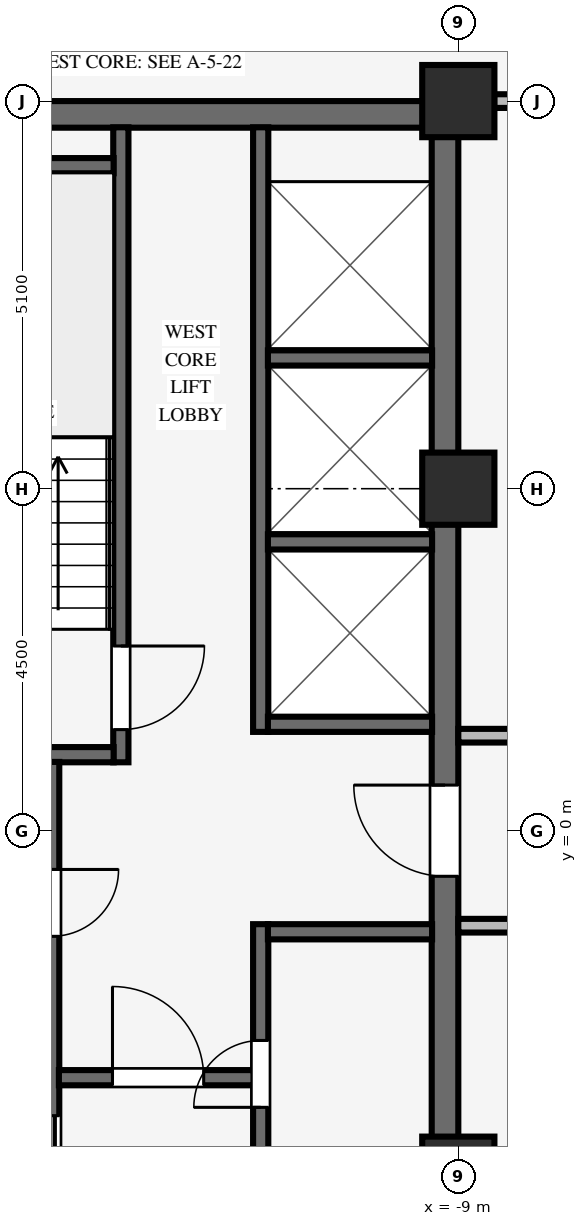
"""IFC4 building model, lengths in metres.
Left out: names, types, materials, properties, quantities, classifications, styles, units other than length and angle.
Written with IfcOpenShell. Run it as: python <this file> out.ifc"""

import sys

from ifc_helpers import new_model, si_unit, direction, frame, frame_2d, origin, origin_2d, place, context, subcontext, project, spatial, rectangle, extrude, source, transform, mapped, element, fill, save


model = new_model("IFC4")
c1 = context("Model", 3, precision=1e-05, world=origin(), true_north=direction((0.0, 1.0)))
c2 = subcontext(c1, "Body", "Model", "MODEL_VIEW")
j1 = project(units=[si_unit("LENGTHUNIT", "METRE"), si_unit("PLANEANGLEUNIT", "RADIAN")], contexts=[c1])
p1 = place(None, origin())
s1 = spatial("IfcSite", under=j1, at=p1, CompositionType="ELEMENT")
p2 = place(p1, origin())
s2 = spatial("IfcBuilding", under=s1, at=p2, CompositionType="ELEMENT")
p3 = place(p2, frame((0.0, 0.0, 216.45)))
s3 = spatial("IfcBuildingStorey", under=s2, at=p3, CompositionType="ELEMENT", Elevation=216.45)
p4 = place(p3, frame((-17.5, 9.425, 0.0), z_axis=(0.0, 0.0, 1.0), x_axis=(1.0, 0.0, 0.0)))
e1 = element("IfcWall", 1, at=p4, inside=s3, PredefinedType="SHEAR", context=c2, shape_type="SweptSolid", body=[
    extrude(rectangle(XDim=8.5, YDim=0.35, at=frame_2d((4.25, 0.0))), origin(), (0.0, 0.0, 1.0), 3.37),
])
p5 = place(p3, frame((-9.175, -9.255, 0.0), z_axis=(0.0, 0.0, 1.0), x_axis=(0.0, 1.0, 0.0)))
e2 = element("IfcWall", 2, at=p5, inside=s3, PredefinedType="SHEAR", context=c2, shape_type="SweptSolid", body=[
    extrude(rectangle(XDim=18.51, YDim=0.35, at=frame_2d((9.255, 0.0))), origin(), (0.0, 0.0, 1.0), 3.37),
])
p6 = place(p5, frame((8.655, 0.0, 0.0)))
e3 = element("IfcOpeningElement", 3, at=p6, cuts=e2, PredefinedType="OPENING", context=c2, shape_type="SweptSolid", body=[
    extrude(rectangle(XDim=1.2, YDim=2.15, at=frame_2d((0.6, 1.075))), frame((0.0, 0.185, 0.0), z_axis=(0.0, -1.0, 0.0), x_axis=(1.0, 0.0, 0.0)), (0.0, 0.0, 1.0), 0.37),
])
for number, where, z_axis, x_axis in (
    (4, (-9.0, -4.5, 0.0), (0.0, 0.0, 1.0), (1.0, 0.0, 0.0)),
    (5, (-9.0, 4.5, 0.0), (0.0, 0.0, 1.0), (1.0, 0.0, 0.0)),
    (6, (-9.0, 9.6, 0.0), (0.0, 0.0, 1.0), (1.0, 0.0, 0.0)),
):
    element("IfcColumn", number, at=place(p3, frame(where, z_axis=z_axis, x_axis=x_axis)), inside=s3, PredefinedType="COLUMN", context=c2, shape_type="SweptSolid", body=[
        extrude(rectangle(XDim=0.95, YDim=0.95, at=origin_2d()), origin(), (0.0, 0.0, 1.0), 3.37),
    ])
p7 = place(p3, frame((-13.44, 0.9, 0.0), z_axis=(0.0, 0.0, 1.0), x_axis=(0.0, 1.0, 0.0)))
e7 = element("IfcWall", 7, at=p7, inside=s3, PredefinedType="SHEAR", context=c2, shape_type="SweptSolid", body=[
    extrude(rectangle(XDim=8.355, YDim=0.2, at=frame_2d((4.177, 0.0))), origin(), (0.0, 0.0, 1.0), 3.37),
])
p8 = place(p7, frame((1.53, 0.0, 0.0), z_axis=(0.0, 0.0, 1.0), x_axis=(-1.0, 0.0, 0.0)))
e8 = element("IfcOpeningElement", 8, at=p8, cuts=e7, PredefinedType="OPENING", context=c2, shape_type="SweptSolid", body=[
    extrude(rectangle(XDim=1.1, YDim=2.15, at=frame_2d((0.55, 1.075))), frame((0.0, 0.11, 0.0), z_axis=(0.0, -1.0, 0.0), x_axis=(1.0, 0.0, 0.0)), (0.0, 0.0, 1.0), 0.22),
])
for number, where, z_axis, x_axis in (
    (9, (-17.155, 1.0, 0.0), (0.0, 0.0, 1.0), (1.0, 0.0, 0.0)),
    (10, (-17.155, 8.75, 0.0), (0.0, 0.0, 1.0), (1.0, 0.0, 0.0)),
):
    element("IfcWall", number, at=place(p3, frame(where, z_axis=z_axis, x_axis=x_axis)), inside=s3, PredefinedType="SHEAR", context=c2, shape_type="SweptSolid", body=[
        extrude(rectangle(XDim=3.62, YDim=0.2, at=frame_2d((1.81, 0.0))), origin(), (0.0, 0.0, 1.0), 3.37),
    ])
p9 = place(p3, frame((-14.35, -6.2, 0.0), z_axis=(0.0, 0.0, 1.0), x_axis=(0.0, 1.0, 0.0)))
e11 = element("IfcWall", 11, at=p9, inside=s3, PredefinedType="SHEAR", context=c2, shape_type="SweptSolid", body=[
    extrude(rectangle(XDim=7.105, YDim=0.2, at=frame_2d((3.552, 0.0))), origin(), (0.0, 0.0, 1.0), 3.37),
])
p10 = place(p9, frame((5.69, 0.0, 0.0), z_axis=(0.0, 0.0, 1.0), x_axis=(-1.0, 0.0, 0.0)))
e12 = element("IfcOpeningElement", 12, at=p10, cuts=e11, PredefinedType="OPENING", context=c2, shape_type="SweptSolid", body=[
    extrude(rectangle(XDim=0.88, YDim=2.1, at=frame_2d((0.44, 1.05))), frame((0.0, 0.11, 0.0), z_axis=(0.0, -1.0, 0.0), x_axis=(1.0, 0.0, 0.0)), (0.0, 0.0, 1.0), 0.22),
])
p11 = place(p9, frame((1.15, 0.0, 0.0)))
e13 = element("IfcOpeningElement", 13, at=p11, cuts=e11, PredefinedType="OPENING", context=c2, shape_type="SweptSolid", body=[
    extrude(rectangle(XDim=1.3, YDim=2.2, at=frame_2d((0.65, 1.1))), frame((0.0, 0.11, 0.0), z_axis=(0.0, -1.0, 0.0), x_axis=(1.0, 0.0, 0.0)), (0.0, 0.0, 1.0), 0.22),
])
p12 = place(p3, frame((-11.6, -9.255, 0.0), z_axis=(0.0, 0.0, 1.0), x_axis=(0.0, 1.0, 0.0)))
e14 = element("IfcWall", 14, at=p12, inside=s3, PredefinedType="SHEAR", context=c2, shape_type="SweptSolid", body=[
    extrude(rectangle(XDim=8.025, YDim=0.2, at=frame_2d((4.012, 0.0))), origin(), (0.0, 0.0, 1.0), 3.37),
])
p13 = place(p12, frame((5.615, 0.0, 0.0)))
e15 = element("IfcOpeningElement", 15, at=p13, cuts=e14, PredefinedType="OPENING", context=c2, shape_type="SweptSolid", body=[
    extrude(rectangle(XDim=0.88, YDim=2.1, at=frame_2d((0.44, 1.05))), frame((0.0, 0.11, 0.0), z_axis=(0.0, -1.0, 0.0), x_axis=(1.0, 0.0, 0.0)), (0.0, 0.0, 1.0), 0.22),
])
p14 = place(p3, frame((-14.255, -3.25, 0.0), z_axis=(0.0, 0.0, 1.0), x_axis=(1.0, 0.0, 0.0)))
e16 = element("IfcWall", 16, at=p14, inside=s3, PredefinedType="SHEAR", context=c2, shape_type="SweptSolid", body=[
    extrude(rectangle(XDim=2.56, YDim=0.2, at=frame_2d((1.28, 0.0))), origin(), (0.0, 0.0, 1.0), 3.37),
])
p15 = place(p14, frame((0.705, 0.0, 0.0)))
e17 = element("IfcOpeningElement", 17, at=p15, cuts=e16, PredefinedType="OPENING", context=c2, shape_type="SweptSolid", body=[
    extrude(rectangle(XDim=1.2, YDim=2.15, at=frame_2d((0.6, 1.075))), frame((0.0, 0.11, 0.0), z_axis=(0.0, -1.0, 0.0), x_axis=(1.0, 0.0, 0.0)), (0.0, 0.0, 1.0), 0.22),
])
p16 = place(p3, frame((-11.505, -1.33, 0.0), z_axis=(0.0, 0.0, 1.0), x_axis=(1.0, 0.0, 0.0)))
e18 = element("IfcWall", 18, at=p16, inside=s3, PredefinedType="SHEAR", context=c2, shape_type="SweptSolid", body=[
    extrude(rectangle(XDim=2.16, YDim=0.2, at=frame_2d((1.08, 0.0))), origin(), (0.0, 0.0, 1.0), 3.37),
])
p17 = place(p3, frame((-11.6, 1.3, 0.0), z_axis=(0.0, 0.0, 1.0), x_axis=(0.0, 1.0, 0.0)))
e19 = element("IfcWall", 19, at=p17, inside=s3, PredefinedType="SHEAR", context=c2, shape_type="SweptSolid", body=[
    extrude(rectangle(XDim=7.955, YDim=0.2, at=frame_2d((3.978, 0.0))), origin(), (0.0, 0.0, 1.0), 3.37),
])
for number, where, z_axis, x_axis in (
    (20, (-11.505, 1.4, 0.0), (0.0, 0.0, 1.0), (1.0, 0.0, 0.0)),
    (21, (-11.505, 3.8, 0.0), (0.0, 0.0, 1.0), (1.0, 0.0, 0.0)),
    (22, (-11.505, 6.22, 0.0), (0.0, 0.0, 1.0), (1.0, 0.0, 0.0)),
):
    element("IfcWall", number, at=place(p3, frame(where, z_axis=z_axis, x_axis=x_axis)), inside=s3, PredefinedType="SHEAR", context=c2, shape_type="SweptSolid", body=[
        extrude(rectangle(XDim=2.16, YDim=0.2, at=frame_2d((1.08, 0.0))), origin(), (0.0, 0.0, 1.0), 3.37),
    ])
p18 = place(p3, frame((-9.0, -1.25, 0.0), z_axis=(0.0, 0.0, 1.0), x_axis=(1.0, 0.0, 0.0)))
e23 = element("IfcWall", 23, at=p18, inside=s3, PredefinedType="PARTITIONING", context=c2, shape_type="SweptSolid", body=[
    extrude(rectangle(XDim=15.6, YDim=0.18, at=frame_2d((7.8, 0.0))), origin(), (0.0, 0.0, 1.0), 3.36),
])
p19 = place(p18, frame((10.97, 0.0, 0.0)))
e24 = element("IfcOpeningElement", 24, at=p19, cuts=e23, PredefinedType="OPENING", context=c2, shape_type="SweptSolid", body=[
    extrude(rectangle(XDim=0.96, YDim=2.1, at=frame_2d((0.48, 1.05))), frame((0.0, 0.1, 0.0), z_axis=(0.0, -1.0, 0.0), x_axis=(1.0, 0.0, 0.0)), (0.0, 0.0, 1.0), 0.2),
])
p20 = place(p18, frame((3.17, 0.0, 0.0)))
e25 = element("IfcOpeningElement", 25, at=p20, cuts=e23, PredefinedType="OPENING", context=c2, shape_type="SweptSolid", body=[
    extrude(rectangle(XDim=0.96, YDim=2.1, at=frame_2d((0.48, 1.05))), frame((0.0, 0.1, 0.0), z_axis=(0.0, -1.0, 0.0), x_axis=(1.0, 0.0, 0.0)), (0.0, 0.0, 1.0), 0.2),
])
p21 = place(p3, frame((-9.0, 1.25, 0.0), z_axis=(0.0, 0.0, 1.0), x_axis=(1.0, 0.0, 0.0)))
e26 = element("IfcWall", 26, at=p21, inside=s3, PredefinedType="PARTITIONING", context=c2, shape_type="SweptSolid", body=[
    extrude(rectangle(XDim=15.6, YDim=0.18, at=frame_2d((7.8, 0.0))), origin(), (0.0, 0.0, 1.0), 3.36),
])
p22 = place(p21, frame((4.87, 0.0, 0.0)))
e27 = element("IfcOpeningElement", 27, at=p22, cuts=e26, PredefinedType="OPENING", context=c2, shape_type="SweptSolid", body=[
    extrude(rectangle(XDim=0.96, YDim=2.1, at=frame_2d((0.48, 1.05))), frame((0.0, 0.1, 0.0), z_axis=(0.0, -1.0, 0.0), x_axis=(1.0, 0.0, 0.0)), (0.0, 0.0, 1.0), 0.2),
])
p23 = place(p3, frame((-8.529, 9.6, 0.0), z_axis=(0.0, 0.0, 1.0), x_axis=(1.0, 0.0, 0.0)))
e28 = element("IfcWall", 28, at=p23, inside=s3, PredefinedType="PARTITIONING", context=c2, shape_type="SweptSolid", body=[
    extrude(rectangle(XDim=8.378, YDim=0.18, at=frame_2d((4.189, 0.0))), origin(), (0.0, 0.0, 1.0), 2.405),
])
m1 = source(origin(), c2, "Body", "SweptSolid", [
    extrude(rectangle(XDim=1.1, YDim=2.15, at=frame_2d((0.55, 1.075))), frame((0.0, 0.025, 0.0), z_axis=(0.0, -1.0, 0.0), x_axis=(1.0, 0.0, 0.0)), (0.0, 0.0, 1.0), 0.05),
])
p24 = place(p8, origin())
e29 = element("IfcDoor", 29, at=p24, inside=s3, OperationType="SINGLE_SWING_LEFT", PredefinedType="DOOR", context=c2, shape_type="MappedRepresentation", body=[
    mapped(m1, transform((0.0, 0.0, 0.0), scale=1.0)),
])
fill(e8, e29)
m2 = source(origin(), c2, "Body", "SweptSolid", [
    extrude(rectangle(XDim=0.88, YDim=2.1, at=frame_2d((0.44, 1.05))), frame((0.0, 0.025, 0.0), z_axis=(0.0, -1.0, 0.0), x_axis=(1.0, 0.0, 0.0)), (0.0, 0.0, 1.0), 0.05),
])
p25 = place(p10, origin())
e30 = element("IfcDoor", 30, at=p25, inside=s3, OperationType="SINGLE_SWING_LEFT", PredefinedType="DOOR", context=c2, shape_type="MappedRepresentation", body=[
    mapped(m2, transform((0.0, 0.0, 0.0), scale=1.0)),
])
fill(e12, e30)
m3 = source(origin(), c2, "Body", "SweptSolid", [
    extrude(rectangle(XDim=1.2, YDim=2.15, at=frame_2d((0.6, 1.075))), frame((0.0, 0.025, 0.0), z_axis=(0.0, -1.0, 0.0), x_axis=(1.0, 0.0, 0.0)), (0.0, 0.0, 1.0), 0.05),
])
p26 = place(p15, origin())
e31 = element("IfcDoor", 31, at=p26, inside=s3, OperationType="SINGLE_SWING_LEFT", PredefinedType="DOOR", context=c2, shape_type="MappedRepresentation", body=[
    mapped(m3, transform((0.0, 0.0, 0.0), scale=1.0)),
])
fill(e17, e31)
p27 = place(p13, origin())
e32 = element("IfcDoor", 32, at=p27, inside=s3, OperationType="SINGLE_SWING_LEFT", PredefinedType="DOOR", context=c2, shape_type="MappedRepresentation", body=[
    mapped(m2, transform((0.0, 0.0, 0.0), scale=1.0)),
])
fill(e15, e32)
p28 = place(p6, origin())
e33 = element("IfcDoor", 33, at=p28, inside=s3, OperationType="SINGLE_SWING_RIGHT", PredefinedType="DOOR", context=c2, shape_type="MappedRepresentation", body=[
    mapped(m3, transform((0.0, 0.0, 0.0), scale=1.0)),
])
fill(e3, e33)
m4 = source(origin(), c2, "Body", "SweptSolid", [
    extrude(rectangle(XDim=1.3, YDim=2.2, at=frame_2d((0.65, 1.1))), frame((0.0, 0.025, 0.0), z_axis=(0.0, -1.0, 0.0), x_axis=(1.0, 0.0, 0.0)), (0.0, 0.0, 1.0), 0.05),
])
p29 = place(p11, origin())
e34 = element("IfcDoor", 34, at=p29, inside=s3, OperationType="DOUBLE_DOOR_SLIDING", PredefinedType="DOOR", context=c2, shape_type="MappedRepresentation", body=[
    mapped(m4, transform((0.0, 0.0, 0.0), scale=1.0)),
])
fill(e13, e34)
save(model, sys.argv[1])
